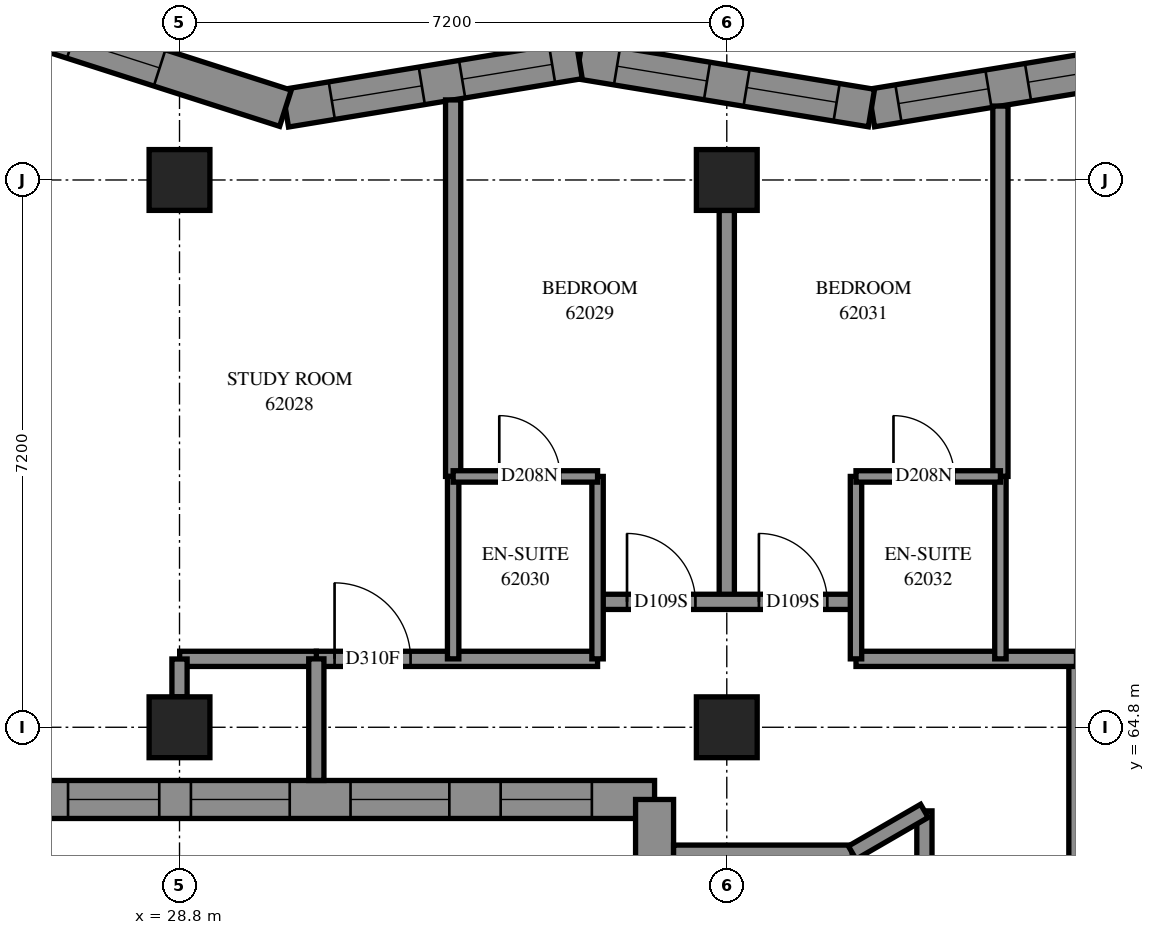
"""IFC4 building model, lengths in metres.
Left out: names, types, materials, properties, quantities, classifications, styles, units other than length and angle.
Written with IfcOpenShell. Run it as: python <this file> out.ifc"""

import sys

from ifc_helpers import new_model, si_unit, direction, frame, frame_2d, origin, origin_2d, place, context, subcontext, project, spatial, polyline, rectangle, outline, extrude, element, fill, save


model = new_model("IFC4")
c1 = context("Model", 3, precision=1e-05, world=origin(), true_north=direction((0.0, 1.0)))
c2 = subcontext(c1, "Body", "Model", "MODEL_VIEW")
j1 = project(units=[si_unit("LENGTHUNIT", "METRE"), si_unit("PLANEANGLEUNIT", "RADIAN")], contexts=[c1])
p1 = place(None, origin())
s1 = spatial("IfcSite", under=j1, at=p1, CompositionType="ELEMENT")
p2 = place(p1, origin())
s2 = spatial("IfcBuilding", under=s1, at=p2, CompositionType="ELEMENT")
p3 = place(p2, frame((0.0, 0.0, 227.0)))
s3 = spatial("IfcBuildingStorey", under=s2, at=p3, CompositionType="ELEMENT", Elevation=227.0)
for number, where, z_axis, x_axis in (
    (1, (28.8, 64.8, 0.0), (0.0, 0.0, 1.0), (1.0, 0.0, 0.0)),
    (2, (28.8, 72.0, 0.0), (0.0, 0.0, 1.0), (1.0, 0.0, 0.0)),
    (3, (36.0, 64.8, 0.0), (0.0, 0.0, 1.0), (1.0, 0.0, 0.0)),
    (4, (36.0, 72.0, 0.0), (0.0, 0.0, 1.0), (1.0, 0.0, 0.0)),
):
    element("IfcColumn", number, at=place(p3, frame(where, z_axis=z_axis, x_axis=x_axis)), inside=s3, PredefinedType="COLUMN", context=c2, shape_type="SweptSolid", body=[
        extrude(rectangle(XDim=0.8, YDim=0.8, at=origin_2d()), origin(), (0.0, 0.0, 1.0), 3.1),
    ])
p4 = place(p3, frame((41.749, 73.58, 0.0), z_axis=(0.0, 0.0, 1.0), x_axis=(-0.9867213513, -0.1624222118, 0.0)))
e5 = element("IfcWall", 5, at=p4, inside=s3, PredefinedType="SOLIDWALL", context=c2, shape_type="SweptSolid", body=[
    extrude(outline(polyline([(-0.041, -0.25), (3.856, -0.25), (3.938, 0.25), (0.041, 0.25), (-0.041, -0.25)])), origin(), (0.0, 0.0, 1.0), 3.1),
])
p5 = place(p4, frame((0.61, 0.0, 0.45)))
e6 = element("IfcOpeningElement", 6, at=p5, cuts=e5, PredefinedType="OPENING", context=c2, shape_type="SweptSolid", body=[
    extrude(rectangle(XDim=1.2, YDim=2.5, at=frame_2d((0.6, 1.25))), frame((0.0, 0.26, 0.0), z_axis=(0.0, -1.0, 0.0), x_axis=(1.0, 0.0, 0.0)), (0.0, 0.0, 1.0), 0.52),
])
p6 = place(p4, frame((2.337, 0.0, 0.45)))
e7 = element("IfcOpeningElement", 7, at=p6, cuts=e5, PredefinedType="OPENING", context=c2, shape_type="SweptSolid", body=[
    extrude(rectangle(XDim=1.2, YDim=2.5, at=frame_2d((0.6, 1.25))), frame((0.0, 0.26, 0.0), z_axis=(0.0, -1.0, 0.0), x_axis=(1.0, 0.0, 0.0)), (0.0, 0.0, 1.0), 0.52),
])
p7 = place(p3, frame((37.903, 72.947, 0.0), z_axis=(0.0, 0.0, 1.0), x_axis=(-0.9867213513, 0.1624222118, 0.0)))
e8 = element("IfcWall", 8, at=p7, inside=s3, PredefinedType="SOLIDWALL", context=c2, shape_type="SweptSolid", body=[
    extrude(outline(polyline([(0.041, -0.25), (3.938, -0.25), (3.856, 0.25), (-0.041, 0.25), (0.041, -0.25)])), origin(), (0.0, 0.0, 1.0), 3.1),
])
p8 = place(p7, frame((0.465, 0.0, 0.45)))
e9 = element("IfcOpeningElement", 9, at=p8, cuts=e8, PredefinedType="OPENING", context=c2, shape_type="SweptSolid", body=[
    extrude(rectangle(XDim=1.2, YDim=2.5, at=frame_2d((0.6, 1.25))), frame((0.0, 0.26, 0.0), z_axis=(0.0, -1.0, 0.0), x_axis=(1.0, 0.0, 0.0)), (0.0, 0.0, 1.0), 0.52),
])
p9 = place(p7, frame((2.192, 0.0, 0.45)))
e10 = element("IfcOpeningElement", 10, at=p9, cuts=e8, PredefinedType="OPENING", context=c2, shape_type="SweptSolid", body=[
    extrude(rectangle(XDim=1.2, YDim=2.5, at=frame_2d((0.6, 1.25))), frame((0.0, 0.26, 0.0), z_axis=(0.0, -1.0, 0.0), x_axis=(1.0, 0.0, 0.0)), (0.0, 0.0, 1.0), 0.52),
])
p10 = place(p3, frame((34.058, 73.58, 0.0), z_axis=(0.0, 0.0, 1.0), x_axis=(-0.9867211316, -0.1624235468, 0.0)))
e11 = element("IfcWall", 11, at=p10, inside=s3, PredefinedType="SOLIDWALL", context=c2, shape_type="SweptSolid", body=[
    extrude(outline(polyline([(-0.041, -0.25), (3.856, -0.25), (3.977, 0.25), (0.041, 0.25), (-0.041, -0.25)])), origin(), (0.0, 0.0, 1.0), 3.1),
])
p11 = place(p10, frame((0.361, 0.0, 0.45)))
e12 = element("IfcOpeningElement", 12, at=p11, cuts=e11, PredefinedType="OPENING", context=c2, shape_type="SweptSolid", body=[
    extrude(rectangle(XDim=1.2, YDim=2.5, at=frame_2d((0.6, 1.25))), frame((0.0, 0.26, 0.0), z_axis=(0.0, -1.0, 0.0), x_axis=(1.0, 0.0, 0.0)), (0.0, 0.0, 1.0), 0.52),
])
p12 = place(p10, frame((2.098, 0.0, 0.45)))
e13 = element("IfcOpeningElement", 13, at=p12, cuts=e11, PredefinedType="OPENING", context=c2, shape_type="SweptSolid", body=[
    extrude(rectangle(XDim=1.2, YDim=2.5, at=frame_2d((0.6, 1.25))), frame((0.0, 0.26, 0.0), z_axis=(0.0, -1.0, 0.0), x_axis=(1.0, 0.0, 0.0)), (0.0, 0.0, 1.0), 0.52),
])
p13 = place(p3, frame((30.194, 72.944, 0.0), z_axis=(0.0, 0.0, 1.0), x_axis=(-0.9522471609, 0.305328257, 0.0)))
e14 = element("IfcWall", 14, at=p13, inside=s3, PredefinedType="SOLIDWALL", context=c2, shape_type="SweptSolid", body=[
    extrude(outline(polyline([(0.06, -0.25), (4.099, -0.25), (3.413, 0.25), (-0.06, 0.25), (0.06, -0.25)])), origin(), (0.0, 0.0, 1.0), 3.1),
])
p14 = place(p13, frame((1.738, 0.0, 0.45)))
e15 = element("IfcOpeningElement", 15, at=p14, cuts=e14, PredefinedType="OPENING", context=c2, shape_type="SweptSolid", body=[
    extrude(rectangle(XDim=1.2, YDim=2.5, at=frame_2d((0.6, 1.25))), frame((0.0, 0.26, 0.0), z_axis=(0.0, -1.0, 0.0), x_axis=(1.0, 0.0, 0.0)), (0.0, 0.0, 1.0), 0.52),
])
p15 = place(p3, frame((26.617, 63.85, 0.0), z_axis=(0.0, 0.0, 1.0), x_axis=(1.0, 0.0, 0.0)))
e16 = element("IfcWall", 16, at=p15, inside=s3, PredefinedType="SOLIDWALL", context=c2, shape_type="SweptSolid", body=[
    extrude(outline(polyline([(-0.25, -0.25), (8.183, -0.25), (8.683, 0.25), (0.25, 0.25), (-0.25, -0.25)])), origin(), (0.0, 0.0, 1.0), 3.1),
])
p16 = place(p15, frame((2.333, 0.0, 0.45)))
e17 = element("IfcOpeningElement", 17, at=p16, cuts=e16, PredefinedType="OPENING", context=c2, shape_type="SweptSolid", body=[
    extrude(rectangle(XDim=1.3, YDim=2.5, at=frame_2d((0.65, 1.25))), frame((0.0, 0.26, 0.0), z_axis=(0.0, -1.0, 0.0), x_axis=(1.0, 0.0, 0.0)), (0.0, 0.0, 1.0), 0.52),
])
p17 = place(p15, frame((4.433, 0.0, 0.45)))
e18 = element("IfcOpeningElement", 18, at=p17, cuts=e16, PredefinedType="OPENING", context=c2, shape_type="SweptSolid", body=[
    extrude(rectangle(XDim=1.3, YDim=2.5, at=frame_2d((0.65, 1.25))), frame((0.0, 0.26, 0.0), z_axis=(0.0, -1.0, 0.0), x_axis=(1.0, 0.0, 0.0)), (0.0, 0.0, 1.0), 0.52),
])
p18 = place(p15, frame((0.717, 0.0, 0.45)))
e19 = element("IfcOpeningElement", 19, at=p18, cuts=e16, PredefinedType="OPENING", context=c2, shape_type="SweptSolid", body=[
    extrude(rectangle(XDim=1.2, YDim=2.5, at=frame_2d((0.6, 1.25))), frame((0.0, 0.26, 0.0), z_axis=(0.0, -1.0, 0.0), x_axis=(1.0, 0.0, 0.0)), (0.0, 0.0, 1.0), 0.52),
])
p19 = place(p15, frame((6.408, 0.0, 0.45)))
e20 = element("IfcOpeningElement", 20, at=p19, cuts=e16, PredefinedType="OPENING", context=c2, shape_type="SweptSolid", body=[
    extrude(rectangle(XDim=1.2, YDim=2.5, at=frame_2d((0.6, 1.25))), frame((0.0, 0.26, 0.0), z_axis=(0.0, -1.0, 0.0), x_axis=(1.0, 0.0, 0.0)), (0.0, 0.0, 1.0), 0.52),
])
p20 = place(p3, frame((35.05, 63.85, 0.0), z_axis=(0.0, 0.0, 1.0), x_axis=(0.0, -1.0, 0.0)))
e21 = element("IfcWall", 21, at=p20, inside=s3, PredefinedType="SOLIDWALL", context=c2, shape_type="SweptSolid", body=[
    extrude(outline(polyline([(0.25, -0.25), (7.45, -0.25), (6.95, 0.25), (-0.25, 0.25), (0.25, -0.25)])), origin(), (0.0, 0.0, 1.0), 3.1),
])
p21 = place(p20, frame((3.05, 0.0, 0.45)))
e22 = element("IfcOpeningElement", 22, at=p21, cuts=e21, PredefinedType="OPENING", context=c2, shape_type="SweptSolid", body=[
    extrude(rectangle(XDim=1.3, YDim=2.5, at=frame_2d((0.65, 1.25))), frame((0.0, 0.26, 0.0), z_axis=(0.0, -1.0, 0.0), x_axis=(1.0, 0.0, 0.0)), (0.0, 0.0, 1.0), 0.52),
])
p22 = place(p20, frame((5.0, 0.0, 0.45)))
e23 = element("IfcOpeningElement", 23, at=p22, cuts=e21, PredefinedType="OPENING", context=c2, shape_type="SweptSolid", body=[
    extrude(rectangle(XDim=1.3, YDim=2.5, at=frame_2d((0.65, 1.25))), frame((0.0, 0.26, 0.0), z_axis=(0.0, -1.0, 0.0), x_axis=(1.0, 0.0, 0.0)), (0.0, 0.0, 1.0), 0.52),
])
p23 = place(p20, frame((0.825, 0.0, 0.45)))
e24 = element("IfcOpeningElement", 24, at=p23, cuts=e21, PredefinedType="OPENING", context=c2, shape_type="SweptSolid", body=[
    extrude(rectangle(XDim=1.2, YDim=2.5, at=frame_2d((0.6, 1.25))), frame((0.0, 0.26, 0.0), z_axis=(0.0, -1.0, 0.0), x_axis=(1.0, 0.0, 0.0)), (0.0, 0.0, 1.0), 0.52),
])
p24 = place(p3, frame((36.0, 66.45, 0.0), z_axis=(0.0, 0.0, 1.0), x_axis=(0.0, 1.0, 0.0)))
e25 = element("IfcWall", 25, at=p24, inside=s3, PredefinedType="PARTITIONING", context=c2, shape_type="SweptSolid", body=[
    extrude(rectangle(XDim=5.15, YDim=0.2, at=frame_2d((2.575, 0.0))), origin(), (0.0, 0.0, 1.0), 3.1),
])
p25 = place(p3, frame((32.4, 68.1, 0.0), z_axis=(0.0, 0.0, 1.0), x_axis=(0.0, 1.0, 0.0)))
e26 = element("IfcWall", 26, at=p25, inside=s3, PredefinedType="PARTITIONING", context=c2, shape_type="SweptSolid", body=[
    extrude(rectangle(XDim=4.953, YDim=0.2, at=frame_2d((2.477, 0.0))), origin(), (0.0, 0.0, 1.0), 3.1),
])
p26 = place(p3, frame((39.6, 68.1, 0.0), z_axis=(0.0, 0.0, 1.0), x_axis=(0.0, 1.0, 0.0)))
e27 = element("IfcWall", 27, at=p26, inside=s3, PredefinedType="PARTITIONING", context=c2, shape_type="SweptSolid", body=[
    extrude(rectangle(XDim=4.872, YDim=0.2, at=frame_2d((2.436, 0.0))), origin(), (0.0, 0.0, 1.0), 3.1),
])
p27 = place(p3, frame((40.6, 61.002, 0.0), z_axis=(0.0, 0.0, 1.0), x_axis=(0.0, 1.0, 0.0)))
e28 = element("IfcWall", 28, at=p27, inside=s3, PredefinedType="PARTITIONING", context=c2, shape_type="SweptSolid", body=[
    extrude(rectangle(XDim=4.696, YDim=0.2, at=frame_2d((2.348, 0.0))), origin(), (0.0, 0.0, 1.0), 3.1),
])
p28 = place(p3, frame((30.6, 65.7, 0.0), z_axis=(0.0, 0.0, 1.0), x_axis=(1.0, 0.0, 0.0)))
e29 = element("IfcWall", 29, at=p28, inside=s3, PredefinedType="PARTITIONING", context=c2, shape_type="SweptSolid", body=[
    extrude(rectangle(XDim=3.7, YDim=0.2, at=frame_2d((1.85, 0.0))), origin(), (0.0, 0.0, 1.0), 3.1),
])
p29 = place(p28, frame((0.24, 0.0, 0.0)))
e30 = element("IfcOpeningElement", 30, at=p29, cuts=e29, PredefinedType="OPENING", context=c2, shape_type="SweptSolid", body=[
    extrude(rectangle(XDim=1.0, YDim=2.1, at=frame_2d((0.5, 1.05))), frame((0.0, 0.11, 0.0), z_axis=(0.0, -1.0, 0.0), x_axis=(1.0, 0.0, 0.0)), (0.0, 0.0, 1.0), 0.22),
])
p30 = place(p3, frame((34.35, 66.45, 0.0), z_axis=(0.0, 0.0, 1.0), x_axis=(1.0, 0.0, 0.0)))
e31 = element("IfcWall", 31, at=p30, inside=s3, PredefinedType="PARTITIONING", context=c2, shape_type="SweptSolid", body=[
    extrude(rectangle(XDim=3.3, YDim=0.2, at=frame_2d((1.65, 0.0))), origin(), (0.0, 0.0, 1.0), 3.1),
])
p31 = place(p30, frame((0.338, 0.0, 0.0)))
e32 = element("IfcOpeningElement", 32, at=p31, cuts=e31, PredefinedType="OPENING", context=c2, shape_type="SweptSolid", body=[
    extrude(rectangle(XDim=0.9, YDim=2.1, at=frame_2d((0.45, 1.05))), frame((0.0, 0.11, 0.0), z_axis=(0.0, -1.0, 0.0), x_axis=(1.0, 0.0, 0.0)), (0.0, 0.0, 1.0), 0.22),
])
p32 = place(p30, frame((2.073, 0.0, 0.0)))
e33 = element("IfcOpeningElement", 33, at=p32, cuts=e31, PredefinedType="OPENING", context=c2, shape_type="SweptSolid", body=[
    extrude(rectangle(XDim=0.9, YDim=2.1, at=frame_2d((0.45, 1.05))), frame((0.0, 0.11, 0.0), z_axis=(0.0, -1.0, 0.0), x_axis=(1.0, 0.0, 0.0)), (0.0, 0.0, 1.0), 0.22),
])
p33 = place(p3, frame((37.7, 65.7, 0.0), z_axis=(0.0, 0.0, 1.0), x_axis=(1.0, 0.0, 0.0)))
e34 = element("IfcWall", 34, at=p33, inside=s3, PredefinedType="PARTITIONING", context=c2, shape_type="SweptSolid", body=[
    extrude(rectangle(XDim=2.9, YDim=0.2, at=frame_2d((1.45, 0.0))), origin(), (0.0, 0.0, 1.0), 3.1),
])
p34 = place(p3, frame((38.6, 61.002, 0.0), z_axis=(0.0, 0.0, 1.0), x_axis=(0.0, 1.0, 0.0)))
e35 = element("IfcWall", 35, at=p34, inside=s3, PredefinedType="PARTITIONING", context=c2, shape_type="SweptSolid", body=[
    extrude(rectangle(XDim=2.698, YDim=0.2, at=frame_2d((1.349, 0.0))), origin(), (0.0, 0.0, 1.0), 3.1),
])
for number, where, z_axis, x_axis in (
    (36, (32.4, 65.7, 0.0), (0.0, 0.0, 1.0), (0.0, 1.0, 0.0)),
    (37, (34.3, 65.7, 0.0), (0.0, 0.0, 1.0), (0.0, 1.0, 0.0)),
    (38, (37.7, 65.7, 0.0), (0.0, 0.0, 1.0), (0.0, 1.0, 0.0)),
    (39, (39.6, 65.7, 0.0), (0.0, 0.0, 1.0), (0.0, 1.0, 0.0)),
):
    element("IfcWall", number, at=place(p3, frame(where, z_axis=z_axis, x_axis=x_axis)), inside=s3, PredefinedType="PARTITIONING", context=c2, shape_type="SweptSolid", body=[
        extrude(rectangle(XDim=2.4, YDim=0.15, at=frame_2d((1.2, 0.0))), origin(), (0.0, 0.0, 1.0), 3.1),
    ])
p35 = place(p3, frame((35.3, 63.15, 0.0), z_axis=(0.0, 0.0, 1.0), x_axis=(1.0, 0.0, 0.0)))
e40 = element("IfcWall", 40, at=p35, inside=s3, PredefinedType="PARTITIONING", context=c2, shape_type="SweptSolid", body=[
    extrude(rectangle(XDim=2.35, YDim=0.2, at=frame_2d((1.175, 0.0))), origin(), (0.0, 0.0, 1.0), 3.1),
])
p36 = place(p3, frame((32.4, 68.1, 0.0), z_axis=(0.0, 0.0, 1.0), x_axis=(1.0, 0.0, 0.0)))
e41 = element("IfcWall", 41, at=p36, inside=s3, PredefinedType="PARTITIONING", context=c2, shape_type="SweptSolid", body=[
    extrude(rectangle(XDim=1.9, YDim=0.15, at=frame_2d((0.95, 0.0))), origin(), (0.0, 0.0, 1.0), 3.1),
])
p37 = place(p36, frame((0.607, 0.0, 0.0)))
e42 = element("IfcOpeningElement", 42, at=p37, cuts=e41, PredefinedType="OPENING", context=c2, shape_type="SweptSolid", body=[
    extrude(rectangle(XDim=0.8, YDim=2.1, at=frame_2d((0.4, 1.05))), frame((0.0, 0.085, 0.0), z_axis=(0.0, -1.0, 0.0), x_axis=(1.0, 0.0, 0.0)), (0.0, 0.0, 1.0), 0.17),
])
p38 = place(p3, frame((37.7, 68.1, 0.0), z_axis=(0.0, 0.0, 1.0), x_axis=(1.0, 0.0, 0.0)))
e43 = element("IfcWall", 43, at=p38, inside=s3, PredefinedType="PARTITIONING", context=c2, shape_type="SweptSolid", body=[
    extrude(rectangle(XDim=1.9, YDim=0.15, at=frame_2d((0.95, 0.0))), origin(), (0.0, 0.0, 1.0), 3.1),
])
p39 = place(p38, frame((0.493, 0.0, 0.0)))
e44 = element("IfcOpeningElement", 44, at=p39, cuts=e43, PredefinedType="OPENING", context=c2, shape_type="SweptSolid", body=[
    extrude(rectangle(XDim=0.8, YDim=2.1, at=frame_2d((0.4, 1.05))), frame((0.0, 0.085, 0.0), z_axis=(0.0, -1.0, 0.0), x_axis=(1.0, 0.0, 0.0)), (0.0, 0.0, 1.0), 0.17),
])
p40 = place(p3, frame((28.802, 65.7, 0.0), z_axis=(0.0, 0.0, 1.0), x_axis=(1.0, 0.0, 0.0)))
e45 = element("IfcWall", 45, at=p40, inside=s3, PredefinedType="PARTITIONING", context=c2, shape_type="SweptSolid", body=[
    extrude(rectangle(XDim=1.798, YDim=0.2, at=frame_2d((0.899, 0.0))), origin(), (0.0, 0.0, 1.0), 3.1),
])
p41 = place(p3, frame((30.6, 64.1, 0.0), z_axis=(0.0, 0.0, 1.0), x_axis=(0.0, 1.0, 0.0)))
e46 = element("IfcWall", 46, at=p41, inside=s3, PredefinedType="PARTITIONING", context=c2, shape_type="SweptSolid", body=[
    extrude(rectangle(XDim=1.6, YDim=0.2, at=frame_2d((0.8, 0.0))), origin(), (0.0, 0.0, 1.0), 3.1),
])
p42 = place(p3, frame((28.8, 65.2, 0.0), z_axis=(0.0, 0.0, 1.0), x_axis=(0.0, 1.0, 0.0)))
e47 = element("IfcWall", 47, at=p42, inside=s3, PredefinedType="PARTITIONING", context=c2, shape_type="SweptSolid", body=[
    extrude(rectangle(XDim=0.498, YDim=0.2, at=frame_2d((0.249, 0.0))), origin(), (0.0, 0.0, 1.0), 2.6),
])
p43 = place(p3, frame((37.65, 63.15, 0.0), z_axis=(0.0, 0.0, 1.0), x_axis=(0.8654262855, 0.5010362705, 0.0)))
e48 = element("IfcWall", 48, at=p43, inside=s3, PredefinedType="PARTITIONING", context=c2, shape_type="SweptSolid", body=[
    extrude(rectangle(XDim=1.098, YDim=0.2, at=frame_2d((0.549, 0.0))), origin(), (0.0, 0.0, 1.0), 3.1),
])
p44 = place(p5, origin())
e49 = element("IfcWindow", 49, at=p44, inside=s3, PartitioningType="SINGLE_PANEL", PredefinedType="WINDOW", context=c2, shape_type="SweptSolid", body=[
    extrude(rectangle(XDim=1.2, YDim=2.5, at=frame_2d((0.6, 1.25))), frame((0.0, 0.18, 0.0), z_axis=(0.0, -1.0, 0.0), x_axis=(1.0, 0.0, 0.0)), (0.0, 0.0, 1.0), 0.06),
])
fill(e6, e49)
p45 = place(p6, origin())
e50 = element("IfcWindow", 50, at=p45, inside=s3, PartitioningType="SINGLE_PANEL", PredefinedType="WINDOW", context=c2, shape_type="SweptSolid", body=[
    extrude(rectangle(XDim=1.2, YDim=2.5, at=frame_2d((0.6, 1.25))), frame((0.0, 0.18, 0.0), z_axis=(0.0, -1.0, 0.0), x_axis=(1.0, 0.0, 0.0)), (0.0, 0.0, 1.0), 0.06),
])
fill(e7, e50)
p46 = place(p8, origin())
e51 = element("IfcWindow", 51, at=p46, inside=s3, PartitioningType="SINGLE_PANEL", PredefinedType="WINDOW", context=c2, shape_type="SweptSolid", body=[
    extrude(rectangle(XDim=1.2, YDim=2.5, at=frame_2d((0.6, 1.25))), frame((0.0, 0.18, 0.0), z_axis=(0.0, -1.0, 0.0), x_axis=(1.0, 0.0, 0.0)), (0.0, 0.0, 1.0), 0.06),
])
fill(e9, e51)
p47 = place(p9, origin())
e52 = element("IfcWindow", 52, at=p47, inside=s3, PartitioningType="SINGLE_PANEL", PredefinedType="WINDOW", context=c2, shape_type="SweptSolid", body=[
    extrude(rectangle(XDim=1.2, YDim=2.5, at=frame_2d((0.6, 1.25))), frame((0.0, 0.18, 0.0), z_axis=(0.0, -1.0, 0.0), x_axis=(1.0, 0.0, 0.0)), (0.0, 0.0, 1.0), 0.06),
])
fill(e10, e52)
p48 = place(p11, origin())
e53 = element("IfcWindow", 53, at=p48, inside=s3, PartitioningType="SINGLE_PANEL", PredefinedType="WINDOW", context=c2, shape_type="SweptSolid", body=[
    extrude(rectangle(XDim=1.2, YDim=2.5, at=frame_2d((0.6, 1.25))), frame((0.0, 0.18, 0.0), z_axis=(0.0, -1.0, 0.0), x_axis=(1.0, 0.0, 0.0)), (0.0, 0.0, 1.0), 0.06),
])
fill(e12, e53)
p49 = place(p12, origin())
e54 = element("IfcWindow", 54, at=p49, inside=s3, PartitioningType="SINGLE_PANEL", PredefinedType="WINDOW", context=c2, shape_type="SweptSolid", body=[
    extrude(rectangle(XDim=1.2, YDim=2.5, at=frame_2d((0.6, 1.25))), frame((0.0, 0.18, 0.0), z_axis=(0.0, -1.0, 0.0), x_axis=(1.0, 0.0, 0.0)), (0.0, 0.0, 1.0), 0.06),
])
fill(e13, e54)
p50 = place(p14, origin())
e55 = element("IfcWindow", 55, at=p50, inside=s3, PartitioningType="SINGLE_PANEL", PredefinedType="WINDOW", context=c2, shape_type="SweptSolid", body=[
    extrude(rectangle(XDim=1.2, YDim=2.5, at=frame_2d((0.6, 1.25))), frame((0.0, 0.18, 0.0), z_axis=(0.0, -1.0, 0.0), x_axis=(1.0, 0.0, 0.0)), (0.0, 0.0, 1.0), 0.06),
])
fill(e15, e55)
p51 = place(p16, origin())
e56 = element("IfcWindow", 56, at=p51, inside=s3, PartitioningType="SINGLE_PANEL", PredefinedType="WINDOW", context=c2, shape_type="SweptSolid", body=[
    extrude(rectangle(XDim=1.3, YDim=2.5, at=frame_2d((0.65, 1.25))), frame((0.0, 0.18, 0.0), z_axis=(0.0, -1.0, 0.0), x_axis=(1.0, 0.0, 0.0)), (0.0, 0.0, 1.0), 0.06),
])
fill(e17, e56)
p52 = place(p17, origin())
e57 = element("IfcWindow", 57, at=p52, inside=s3, PartitioningType="SINGLE_PANEL", PredefinedType="WINDOW", context=c2, shape_type="SweptSolid", body=[
    extrude(rectangle(XDim=1.3, YDim=2.5, at=frame_2d((0.65, 1.25))), frame((0.0, 0.18, 0.0), z_axis=(0.0, -1.0, 0.0), x_axis=(1.0, 0.0, 0.0)), (0.0, 0.0, 1.0), 0.06),
])
fill(e18, e57)
p53 = place(p18, origin())
e58 = element("IfcWindow", 58, at=p53, inside=s3, PartitioningType="SINGLE_PANEL", PredefinedType="WINDOW", context=c2, shape_type="SweptSolid", body=[
    extrude(rectangle(XDim=1.2, YDim=2.5, at=frame_2d((0.6, 1.25))), frame((0.0, 0.18, 0.0), z_axis=(0.0, -1.0, 0.0), x_axis=(1.0, 0.0, 0.0)), (0.0, 0.0, 1.0), 0.06),
])
fill(e19, e58)
p54 = place(p19, origin())
e59 = element("IfcWindow", 59, at=p54, inside=s3, PartitioningType="SINGLE_PANEL", PredefinedType="WINDOW", context=c2, shape_type="SweptSolid", body=[
    extrude(rectangle(XDim=1.2, YDim=2.5, at=frame_2d((0.6, 1.25))), frame((0.0, 0.18, 0.0), z_axis=(0.0, -1.0, 0.0), x_axis=(1.0, 0.0, 0.0)), (0.0, 0.0, 1.0), 0.06),
])
fill(e20, e59)
p55 = place(p29, origin())
e60 = element("IfcDoor", 60, at=p55, inside=s3, OperationType="SINGLE_SWING_RIGHT", PredefinedType="DOOR", context=c2, shape_type="SweptSolid", body=[
    extrude(rectangle(XDim=1.0, YDim=2.1, at=frame_2d((0.5, 1.05))), frame((0.0, 0.025, 0.0), z_axis=(0.0, -1.0, 0.0), x_axis=(1.0, 0.0, 0.0)), (0.0, 0.0, 1.0), 0.05),
])
fill(e30, e60)
p56 = place(p31, origin())
e61 = element("IfcDoor", 61, at=p56, inside=s3, OperationType="SINGLE_SWING_LEFT", PredefinedType="DOOR", context=c2, shape_type="SweptSolid", body=[
    extrude(rectangle(XDim=0.9, YDim=2.1, at=frame_2d((0.45, 1.05))), frame((0.0, 0.025, 0.0), z_axis=(0.0, -1.0, 0.0), x_axis=(1.0, 0.0, 0.0)), (0.0, 0.0, 1.0), 0.05),
])
fill(e32, e61)
p57 = place(p37, origin())
e62 = element("IfcDoor", 62, at=p57, inside=s3, OperationType="SINGLE_SWING_RIGHT", PredefinedType="DOOR", context=c2, shape_type="SweptSolid", body=[
    extrude(rectangle(XDim=0.8, YDim=2.1, at=frame_2d((0.4, 1.05))), frame((0.0, 0.025, 0.0), z_axis=(0.0, -1.0, 0.0), x_axis=(1.0, 0.0, 0.0)), (0.0, 0.0, 1.0), 0.05),
])
fill(e42, e62)
p58 = place(p32, origin())
e63 = element("IfcDoor", 63, at=p58, inside=s3, OperationType="SINGLE_SWING_RIGHT", PredefinedType="DOOR", context=c2, shape_type="SweptSolid", body=[
    extrude(rectangle(XDim=0.9, YDim=2.1, at=frame_2d((0.45, 1.05))), frame((0.0, 0.025, 0.0), z_axis=(0.0, -1.0, 0.0), x_axis=(1.0, 0.0, 0.0)), (0.0, 0.0, 1.0), 0.05),
])
fill(e33, e63)
p59 = place(p39, origin())
e64 = element("IfcDoor", 64, at=p59, inside=s3, OperationType="SINGLE_SWING_RIGHT", PredefinedType="DOOR", context=c2, shape_type="SweptSolid", body=[
    extrude(rectangle(XDim=0.8, YDim=2.1, at=frame_2d((0.4, 1.05))), frame((0.0, 0.025, 0.0), z_axis=(0.0, -1.0, 0.0), x_axis=(1.0, 0.0, 0.0)), (0.0, 0.0, 1.0), 0.05),
])
fill(e44, e64)
save(model, sys.argv[1])
